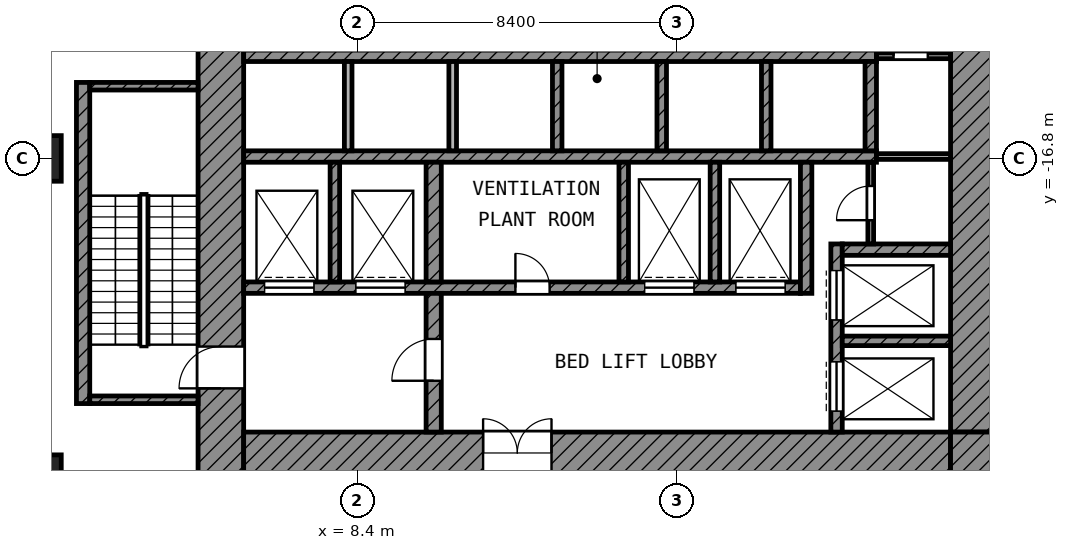
"""IFC4 building model, lengths in metres.
Left out: names, types, materials, properties, quantities, classifications, styles, units other than length and angle.
Written with IfcOpenShell. Run it as: python <this file> out.ifc"""

import sys

from ifc_helpers import new_model, si_unit, direction, frame, frame_2d, origin, origin_2d, place, context, subcontext, project, spatial, rectangle, extrude, element, fill, save


model = new_model("IFC4")
c1 = context("Model", 3, precision=1e-05, world=origin(), true_north=direction((0.0, 1.0)))
c2 = subcontext(c1, "Body", "Model", "MODEL_VIEW")
j1 = project(units=[si_unit("LENGTHUNIT", "METRE"), si_unit("PLANEANGLEUNIT", "RADIAN")], contexts=[c1])
p1 = place(None, origin())
s1 = spatial("IfcSite", under=j1, at=p1, CompositionType="ELEMENT")
p2 = place(p1, origin())
s2 = spatial("IfcBuilding", under=s1, at=p2, CompositionType="ELEMENT")
p3 = place(p2, frame((0.0, 0.0, 34.2)))
s3 = spatial("IfcBuildingStorey", under=s2, at=p3, CompositionType="ELEMENT", Elevation=34.2)
for number, where, z_axis, x_axis in (
    (1, (0.0, -16.8, 0.0), (0.0, 0.0, 1.0), (1.0, 0.0, 0.0)),
    (2, (0.0, -25.2, 0.0), (0.0, 0.0, 1.0), (1.0, 0.0, 0.0)),
):
    element("IfcColumn", number, at=place(p3, frame(where, z_axis=z_axis, x_axis=x_axis)), inside=s3, PredefinedType="COLUMN", context=c2, shape_type="SweptSolid", body=[
        extrude(rectangle(XDim=1.2, YDim=1.2, at=origin_2d()), origin(), (0.0, 0.0, 1.0), 5.0),
    ])
p4 = place(p3, frame((4.8, -25.1, 0.0), z_axis=(0.0, 0.0, 1.0), x_axis=(0.0, 1.0, 0.0)))
e3 = element("IfcWall", 3, at=p4, inside=s3, PredefinedType="SHEAR", context=c2, shape_type="SweptSolid", body=[
    extrude(rectangle(XDim=19.7, YDim=1.2, at=frame_2d((9.85, 0.0))), origin(), (0.0, 0.0, 1.0), 4.58),
])
p5 = place(p4, frame((11.55, 0.0, 0.0)))
e4 = element("IfcOpeningElement", 4, at=p5, cuts=e3, PredefinedType="OPENING", context=c2, shape_type="SweptSolid", body=[
    extrude(rectangle(XDim=1.1, YDim=2.1, at=frame_2d((0.55, 1.05))), frame((0.0, 0.61, 0.0), z_axis=(0.0, -1.0, 0.0), x_axis=(1.0, 0.0, 0.0)), (0.0, 0.0, 1.0), 1.22),
])
p6 = place(p4, frame((2.25, 0.0, 0.0)))
e5 = element("IfcOpeningElement", 5, at=p6, cuts=e3, PredefinedType="OPENING", context=c2, shape_type="SweptSolid", body=[
    extrude(rectangle(XDim=1.1, YDim=2.1, at=frame_2d((0.55, 1.05))), frame((0.0, 0.61, 0.0), z_axis=(0.0, -1.0, 0.0), x_axis=(1.0, 0.0, 0.0)), (0.0, 0.0, 1.0), 1.22),
])
p7 = place(p3, frame((24.55, -24.0, 0.0), z_axis=(0.0, 0.0, 1.0), x_axis=(0.0, 1.0, 0.0)))
e6 = element("IfcWall", 6, at=p7, inside=s3, PredefinedType="SHEAR", context=c2, shape_type="SweptSolid", body=[
    extrude(rectangle(XDim=18.6, YDim=1.1, at=frame_2d((9.3, 0.0))), origin(), (0.0, 0.0, 1.0), 4.58),
])
p8 = place(p7, frame((10.5, 0.0, 0.0)))
e7 = element("IfcOpeningElement", 7, at=p8, cuts=e6, PredefinedType="OPENING", context=c2, shape_type="SweptSolid", body=[
    extrude(rectangle(XDim=1.8, YDim=2.1, at=frame_2d((0.9, 1.05))), frame((0.0, 0.56, 0.0), z_axis=(0.0, -1.0, 0.0), x_axis=(1.0, 0.0, 0.0)), (0.0, 0.0, 1.0), 1.12),
])
p9 = place(p3, frame((5.4, -24.55, 0.0), z_axis=(0.0, 0.0, 1.0), x_axis=(1.0, 0.0, 0.0)))
e8 = element("IfcWall", 8, at=p9, inside=s3, PredefinedType="SHEAR", context=c2, shape_type="SweptSolid", body=[
    extrude(rectangle(XDim=18.6, YDim=1.1, at=frame_2d((9.3, 0.0))), origin(), (0.0, 0.0, 1.0), 4.58),
])
p10 = place(p9, frame((6.3, 0.0, 0.0)))
e9 = element("IfcOpeningElement", 9, at=p10, cuts=e8, PredefinedType="OPENING", context=c2, shape_type="SweptSolid", body=[
    extrude(rectangle(XDim=1.8, YDim=2.1, at=frame_2d((0.9, 1.05))), frame((0.0, 0.56, 0.0), z_axis=(0.0, -1.0, 0.0), x_axis=(1.0, 0.0, 0.0)), (0.0, 0.0, 1.0), 1.12),
])
p11 = place(p3, frame((24.55, -25.1, 0.0), z_axis=(0.0, 0.0, 1.0), x_axis=(0.0, 1.0, 0.0)))
e10 = element("IfcWall", 10, at=p11, inside=s3, PredefinedType="SHEAR", context=c2, shape_type="SweptSolid", body=[
    extrude(rectangle(XDim=1.1, YDim=1.1, at=frame_2d((0.55, 0.0))), origin(), (0.0, 0.0, 1.0), 4.58),
])
for number, where, z_axis, x_axis in (
    (11, (5.4, -14.1, 0.0), (0.0, 0.0, 1.0), (1.0, 0.0, 0.0)),
    (12, (5.4, -16.75, 0.0), (0.0, 0.0, 1.0), (1.0, 0.0, 0.0)),
):
    element("IfcWall", number, at=place(p3, frame(where, z_axis=z_axis, x_axis=x_axis)), inside=s3, PredefinedType="SHEAR", context=c2, shape_type="SweptSolid", body=[
        extrude(rectangle(XDim=16.65, YDim=0.3, at=frame_2d((8.325, 0.0))), origin(), (0.0, 0.0, 1.0), 4.58),
    ])
p12 = place(p3, frame((5.4, -20.2, 0.0), z_axis=(0.0, 0.0, 1.0), x_axis=(1.0, 0.0, 0.0)))
e13 = element("IfcWall", 13, at=p12, inside=s3, PredefinedType="SHEAR", context=c2, shape_type="SweptSolid", body=[
    extrude(rectangle(XDim=14.65, YDim=0.3, at=frame_2d((7.325, 0.0))), origin(), (0.0, 0.0, 1.0), 4.58),
])
p13 = place(p12, frame((10.55, 0.0, 0.0)))
e14 = element("IfcOpeningElement", 14, at=p13, cuts=e13, PredefinedType="OPENING", context=c2, shape_type="SweptSolid", body=[
    extrude(rectangle(XDim=1.3, YDim=2.1, at=frame_2d((0.65, 1.05))), frame((0.0, 0.16, 0.0), z_axis=(0.0, -1.0, 0.0), x_axis=(1.0, 0.0, 0.0)), (0.0, 0.0, 1.0), 0.32),
])
p14 = place(p12, frame((12.95, 0.0, 0.0)))
e15 = element("IfcOpeningElement", 15, at=p14, cuts=e13, PredefinedType="OPENING", context=c2, shape_type="SweptSolid", body=[
    extrude(rectangle(XDim=1.3, YDim=2.1, at=frame_2d((0.65, 1.05))), frame((0.0, 0.16, 0.0), z_axis=(0.0, -1.0, 0.0), x_axis=(1.0, 0.0, 0.0)), (0.0, 0.0, 1.0), 0.32),
])
p15 = place(p12, frame((0.55, 0.0, 0.0)))
e16 = element("IfcOpeningElement", 16, at=p15, cuts=e13, PredefinedType="OPENING", context=c2, shape_type="SweptSolid", body=[
    extrude(rectangle(XDim=1.3, YDim=2.1, at=frame_2d((0.65, 1.05))), frame((0.0, 0.16, 0.0), z_axis=(0.0, -1.0, 0.0), x_axis=(1.0, 0.0, 0.0)), (0.0, 0.0, 1.0), 0.32),
])
p16 = place(p12, frame((2.95, 0.0, 0.0)))
e17 = element("IfcOpeningElement", 17, at=p16, cuts=e13, PredefinedType="OPENING", context=c2, shape_type="SweptSolid", body=[
    extrude(rectangle(XDim=1.3, YDim=2.1, at=frame_2d((0.65, 1.05))), frame((0.0, 0.16, 0.0), z_axis=(0.0, -1.0, 0.0), x_axis=(1.0, 0.0, 0.0)), (0.0, 0.0, 1.0), 0.32),
])
p17 = place(p12, frame((7.15, 0.0, 0.0)))
e18 = element("IfcOpeningElement", 18, at=p17, cuts=e13, PredefinedType="OPENING", context=c2, shape_type="SweptSolid", body=[
    extrude(rectangle(XDim=0.9, YDim=2.1, at=frame_2d((0.45, 1.05))), frame((0.0, 0.16, 0.0), z_axis=(0.0, -1.0, 0.0), x_axis=(1.0, 0.0, 0.0)), (0.0, 0.0, 1.0), 0.32),
])
p18 = place(p3, frame((10.4, -24.0, 0.0), z_axis=(0.0, 0.0, 1.0), x_axis=(0.0, 1.0, 0.0)))
e19 = element("IfcWall", 19, at=p18, inside=s3, PredefinedType="SHEAR", context=c2, shape_type="SweptSolid", body=[
    extrude(rectangle(XDim=3.65, YDim=0.4, at=frame_2d((1.825, 0.0))), origin(), (0.0, 0.0, 1.0), 4.58),
])
p19 = place(p18, frame((1.35, 0.0, 0.0)))
e20 = element("IfcOpeningElement", 20, at=p19, cuts=e19, PredefinedType="OPENING", context=c2, shape_type="SweptSolid", body=[
    extrude(rectangle(XDim=1.1, YDim=2.1, at=frame_2d((0.55, 1.05))), frame((0.0, 0.21, 0.0), z_axis=(0.0, -1.0, 0.0), x_axis=(1.0, 0.0, 0.0)), (0.0, 0.0, 1.0), 0.42),
])
p20 = place(p3, frame((10.4, -20.05, 0.0), z_axis=(0.0, 0.0, 1.0), x_axis=(0.0, 1.0, 0.0)))
e21 = element("IfcWall", 21, at=p20, inside=s3, PredefinedType="SHEAR", context=c2, shape_type="SweptSolid", body=[
    extrude(rectangle(XDim=3.15, YDim=0.4, at=frame_2d((1.575, 0.0))), origin(), (0.0, 0.0, 1.0), 4.58),
])
p21 = place(p3, frame((20.2, -20.35, 0.0), z_axis=(0.0, 0.0, 1.0), x_axis=(0.0, 1.0, 0.0)))
e22 = element("IfcWall", 22, at=p21, inside=s3, PredefinedType="SHEAR", context=c2, shape_type="SweptSolid", body=[
    extrude(rectangle(XDim=3.45, YDim=0.3, at=frame_2d((1.725, 0.0))), origin(), (0.0, 0.0, 1.0), 4.58),
])
p22 = place(p3, frame((21.9, -16.6, 0.0), z_axis=(0.0, 0.0, 1.0), x_axis=(0.0, 1.0, 0.0)))
e23 = element("IfcWall", 23, at=p22, inside=s3, PredefinedType="SHEAR", context=c2, shape_type="SweptSolid", body=[
    extrude(rectangle(XDim=2.35, YDim=0.3, at=frame_2d((1.175, 0.0))), origin(), (0.0, 0.0, 1.0), 4.58),
])
p23 = place(p3, frame((21.15, -19.2, 0.0), z_axis=(0.0, 0.0, 1.0), x_axis=(1.0, 0.0, 0.0)))
e24 = element("IfcWall", 24, at=p23, inside=s3, PredefinedType="SHEAR", context=c2, shape_type="SweptSolid", body=[
    extrude(rectangle(XDim=2.85, YDim=0.3, at=frame_2d((1.425, 0.0))), origin(), (0.0, 0.0, 1.0), 4.58),
])
p24 = place(p3, frame((21.0, -24.0, 0.0), z_axis=(0.0, 0.0, 1.0), x_axis=(0.0, 1.0, 0.0)))
e25 = element("IfcWall", 25, at=p24, inside=s3, PredefinedType="SHEAR", context=c2, shape_type="SweptSolid", body=[
    extrude(rectangle(XDim=4.95, YDim=0.3, at=frame_2d((2.475, 0.0))), origin(), (0.0, 0.0, 1.0), 4.58),
])
p25 = place(p24, frame((2.95, 0.0, 0.0)))
e26 = element("IfcOpeningElement", 26, at=p25, cuts=e25, PredefinedType="OPENING", context=c2, shape_type="SweptSolid", body=[
    extrude(rectangle(XDim=1.3, YDim=2.1, at=frame_2d((0.65, 1.05))), frame((0.0, 0.16, 0.0), z_axis=(0.0, -1.0, 0.0), x_axis=(1.0, 0.0, 0.0)), (0.0, 0.0, 1.0), 0.32),
])
p26 = place(p24, frame((0.55, 0.0, 0.0)))
e27 = element("IfcOpeningElement", 27, at=p26, cuts=e25, PredefinedType="OPENING", context=c2, shape_type="SweptSolid", body=[
    extrude(rectangle(XDim=1.3, YDim=2.1, at=frame_2d((0.65, 1.05))), frame((0.0, 0.16, 0.0), z_axis=(0.0, -1.0, 0.0), x_axis=(1.0, 0.0, 0.0)), (0.0, 0.0, 1.0), 0.32),
])
p27 = place(p3, frame((21.15, -21.6, 0.0), z_axis=(0.0, 0.0, 1.0), x_axis=(1.0, 0.0, 0.0)))
e28 = element("IfcWall", 28, at=p27, inside=s3, PredefinedType="SHEAR", context=c2, shape_type="SweptSolid", body=[
    extrude(rectangle(XDim=2.85, YDim=0.25, at=frame_2d((1.425, 0.0))), origin(), (0.0, 0.0, 1.0), 4.58),
])
for number, where, z_axis, x_axis in (
    (29, (7.8, -20.05, 0.0), (0.0, 0.0, 1.0), (0.0, 1.0, 0.0)),
    (30, (15.4, -20.05, 0.0), (0.0, 0.0, 1.0), (0.0, 1.0, 0.0)),
    (31, (17.8, -20.05, 0.0), (0.0, 0.0, 1.0), (0.0, 1.0, 0.0)),
):
    element("IfcWall", number, at=place(p3, frame(where, z_axis=z_axis, x_axis=x_axis)), inside=s3, PredefinedType="SHEAR", context=c2, shape_type="SweptSolid", body=[
        extrude(rectangle(XDim=3.15, YDim=0.25, at=frame_2d((1.575, 0.0))), origin(), (0.0, 0.0, 1.0), 4.58),
    ])
for number, where, z_axis, x_axis in (
    (32, (8.15, -16.6, 0.0), (0.0, 0.0, 1.0), (0.0, 1.0, 0.0)),
    (33, (10.9, -16.6, 0.0), (0.0, 0.0, 1.0), (0.0, 1.0, 0.0)),
):
    element("IfcWall", number, at=place(p3, frame(where, z_axis=z_axis, x_axis=x_axis)), inside=s3, PredefinedType="PARTITIONING", context=c2, shape_type="SweptSolid", body=[
        extrude(rectangle(XDim=2.35, YDim=0.2, at=frame_2d((1.175, 0.0))), origin(), (0.0, 0.0, 1.0), 4.58),
    ])
for number, where, z_axis, x_axis in (
    (34, (13.65, -16.6, 0.0), (0.0, 0.0, 1.0), (0.0, 1.0, 0.0)),
    (35, (16.4, -16.6, 0.0), (0.0, 0.0, 1.0), (0.0, 1.0, 0.0)),
    (36, (19.15, -16.6, 0.0), (0.0, 0.0, 1.0), (0.0, 1.0, 0.0)),
):
    element("IfcWall", number, at=place(p3, frame(where, z_axis=z_axis, x_axis=x_axis)), inside=s3, PredefinedType="SHEAR", context=c2, shape_type="SweptSolid", body=[
        extrude(rectangle(XDim=2.35, YDim=0.25, at=frame_2d((1.175, 0.0))), origin(), (0.0, 0.0, 1.0), 4.58),
    ])
p28 = place(p3, frame((21.9, -19.05, 0.0), z_axis=(0.0, 0.0, 1.0), x_axis=(0.0, 1.0, 0.0)))
e37 = element("IfcWall", 37, at=p28, inside=s3, PredefinedType="PARTITIONING", context=c2, shape_type="SweptSolid", body=[
    extrude(rectangle(XDim=2.15, YDim=0.15, at=frame_2d((1.075, 0.0))), origin(), (0.0, 0.0, 1.0), 4.58),
])
p29 = place(p28, frame((0.625, 0.0, 0.0)))
e38 = element("IfcOpeningElement", 38, at=p29, cuts=e37, PredefinedType="OPENING", context=c2, shape_type="SweptSolid", body=[
    extrude(rectangle(XDim=0.9, YDim=2.1, at=frame_2d((0.45, 1.05))), frame((0.0, 0.085, 0.0), z_axis=(0.0, -1.0, 0.0), x_axis=(1.0, 0.0, 0.0)), (0.0, 0.0, 1.0), 0.17),
])
p30 = place(p3, frame((22.05, -16.75, 0.0), z_axis=(0.0, 0.0, 1.0), x_axis=(1.0, 0.0, 0.0)))
e39 = element("IfcWall", 39, at=p30, inside=s3, PredefinedType="PARTITIONING", context=c2, shape_type="SweptSolid", body=[
    extrude(rectangle(XDim=1.95, YDim=0.15, at=frame_2d((0.975, 0.0))), origin(), (0.0, 0.0, 1.0), 4.58),
])
p31 = place(p3, frame((22.05, -14.1, 0.0), z_axis=(0.0, 0.0, 1.0), x_axis=(1.0, 0.0, 0.0)))
e40 = element("IfcWall", 40, at=p31, inside=s3, PredefinedType="PARTITIONING", context=c2, shape_type="SweptSolid", body=[
    extrude(rectangle(XDim=1.95, YDim=0.15, at=frame_2d((0.975, 0.0))), origin(), (0.0, 0.0, 1.0), 4.58),
])
p32 = place(p31, frame((0.45, 0.0, 0.0)))
e41 = element("IfcOpeningElement", 41, at=p32, cuts=e40, PredefinedType="OPENING", context=c2, shape_type="SweptSolid", body=[
    extrude(rectangle(XDim=0.9, YDim=2.1, at=frame_2d((0.45, 1.05))), frame((0.0, 0.085, 0.0), z_axis=(0.0, -1.0, 0.0), x_axis=(1.0, 0.0, 0.0)), (0.0, 0.0, 1.0), 0.17),
])
p33 = place(p3, frame((1.175, -23.25, 0.0), z_axis=(0.0, 0.0, 1.0), x_axis=(0.0, 1.0, 0.0)))
e42 = element("IfcWall", 42, at=p33, inside=s3, PredefinedType="SHEAR", context=c2, shape_type="SweptSolid", body=[
    extrude(rectangle(XDim=8.45, YDim=0.35, at=frame_2d((4.225, 0.0))), origin(), (0.0, 0.0, 1.0), 4.58),
])
for number, where, z_axis, x_axis in (
    (43, (1.35, -14.9, 0.0), (0.0, 0.0, 1.0), (1.0, 0.0, 0.0)),
    (44, (1.35, -23.15, 0.0), (0.0, 0.0, 1.0), (1.0, 0.0, 0.0)),
):
    element("IfcWall", number, at=place(p3, frame(where, z_axis=z_axis, x_axis=x_axis)), inside=s3, PredefinedType="SHEAR", context=c2, shape_type="SweptSolid", body=[
        extrude(rectangle(XDim=2.85, YDim=0.2, at=frame_2d((1.425, 0.0))), origin(), (0.0, 0.0, 1.0), 4.58),
    ])
p34 = place(p25, origin())
e45 = element("IfcDoor", 45, at=p34, inside=s3, OperationType="DOUBLE_DOOR_SLIDING", PredefinedType="DOOR", context=c2, shape_type="SweptSolid", body=[
    extrude(rectangle(XDim=1.3, YDim=2.1, at=frame_2d((0.65, 1.05))), frame((0.0, 0.025, 0.0), z_axis=(0.0, -1.0, 0.0), x_axis=(1.0, 0.0, 0.0)), (0.0, 0.0, 1.0), 0.05),
])
fill(e26, e45)
p35 = place(p26, origin())
e46 = element("IfcDoor", 46, at=p35, inside=s3, OperationType="DOUBLE_DOOR_SLIDING", PredefinedType="DOOR", context=c2, shape_type="SweptSolid", body=[
    extrude(rectangle(XDim=1.3, YDim=2.1, at=frame_2d((0.65, 1.05))), frame((0.0, 0.025, 0.0), z_axis=(0.0, -1.0, 0.0), x_axis=(1.0, 0.0, 0.0)), (0.0, 0.0, 1.0), 0.05),
])
fill(e27, e46)
p36 = place(p13, origin())
e47 = element("IfcDoor", 47, at=p36, inside=s3, OperationType="DOUBLE_DOOR_SLIDING", PredefinedType="DOOR", context=c2, shape_type="SweptSolid", body=[
    extrude(rectangle(XDim=1.3, YDim=2.1, at=frame_2d((0.65, 1.05))), frame((0.0, 0.025, 0.0), z_axis=(0.0, -1.0, 0.0), x_axis=(1.0, 0.0, 0.0)), (0.0, 0.0, 1.0), 0.05),
])
fill(e14, e47)
p37 = place(p14, origin())
e48 = element("IfcDoor", 48, at=p37, inside=s3, OperationType="DOUBLE_DOOR_SLIDING", PredefinedType="DOOR", context=c2, shape_type="SweptSolid", body=[
    extrude(rectangle(XDim=1.3, YDim=2.1, at=frame_2d((0.65, 1.05))), frame((0.0, 0.025, 0.0), z_axis=(0.0, -1.0, 0.0), x_axis=(1.0, 0.0, 0.0)), (0.0, 0.0, 1.0), 0.05),
])
fill(e15, e48)
p38 = place(p15, origin())
e49 = element("IfcDoor", 49, at=p38, inside=s3, OperationType="DOUBLE_DOOR_SLIDING", PredefinedType="DOOR", context=c2, shape_type="SweptSolid", body=[
    extrude(rectangle(XDim=1.3, YDim=2.1, at=frame_2d((0.65, 1.05))), frame((0.0, 0.025, 0.0), z_axis=(0.0, -1.0, 0.0), x_axis=(1.0, 0.0, 0.0)), (0.0, 0.0, 1.0), 0.05),
])
fill(e16, e49)
p39 = place(p16, origin())
e50 = element("IfcDoor", 50, at=p39, inside=s3, OperationType="DOUBLE_DOOR_SLIDING", PredefinedType="DOOR", context=c2, shape_type="SweptSolid", body=[
    extrude(rectangle(XDim=1.3, YDim=2.1, at=frame_2d((0.65, 1.05))), frame((0.0, 0.025, 0.0), z_axis=(0.0, -1.0, 0.0), x_axis=(1.0, 0.0, 0.0)), (0.0, 0.0, 1.0), 0.05),
])
fill(e17, e50)
p40 = place(p6, origin())
e51 = element("IfcDoor", 51, at=p40, inside=s3, OperationType="SINGLE_SWING_LEFT", PredefinedType="DOOR", context=c2, shape_type="SweptSolid", body=[
    extrude(rectangle(XDim=1.1, YDim=2.1, at=frame_2d((0.55, 1.05))), frame((0.0, 0.025, 0.0), z_axis=(0.0, -1.0, 0.0), x_axis=(1.0, 0.0, 0.0)), (0.0, 0.0, 1.0), 0.05),
])
fill(e5, e51)
p41 = place(p19, origin())
e52 = element("IfcDoor", 52, at=p41, inside=s3, OperationType="SINGLE_SWING_LEFT", PredefinedType="DOOR", context=c2, shape_type="SweptSolid", body=[
    extrude(rectangle(XDim=1.1, YDim=2.1, at=frame_2d((0.55, 1.05))), frame((0.0, 0.025, 0.0), z_axis=(0.0, -1.0, 0.0), x_axis=(1.0, 0.0, 0.0)), (0.0, 0.0, 1.0), 0.05),
])
fill(e20, e52)
p42 = place(p10, origin())
e53 = element("IfcDoor", 53, at=p42, inside=s3, OperationType="DOUBLE_DOOR_SINGLE_SWING", PredefinedType="DOOR", context=c2, shape_type="SweptSolid", body=[
    extrude(rectangle(XDim=1.8, YDim=2.1, at=frame_2d((0.9, 1.05))), frame((0.0, 0.025, 0.0), z_axis=(0.0, -1.0, 0.0), x_axis=(1.0, 0.0, 0.0)), (0.0, 0.0, 1.0), 0.05),
])
fill(e9, e53)
p43 = place(p32, origin())
e54 = element("IfcDoor", 54, at=p43, inside=s3, OperationType="SINGLE_SWING_LEFT", PredefinedType="DOOR", context=c2, shape_type="SweptSolid", body=[
    extrude(rectangle(XDim=0.9, YDim=2.1, at=frame_2d((0.45, 1.05))), frame((0.0, 0.025, 0.0), z_axis=(0.0, -1.0, 0.0), x_axis=(1.0, 0.0, 0.0)), (0.0, 0.0, 1.0), 0.05),
])
fill(e41, e54)
p44 = place(p29, origin())
e55 = element("IfcDoor", 55, at=p44, inside=s3, OperationType="SINGLE_SWING_LEFT", PredefinedType="DOOR", context=c2, shape_type="SweptSolid", body=[
    extrude(rectangle(XDim=0.9, YDim=2.1, at=frame_2d((0.45, 1.05))), frame((0.0, 0.025, 0.0), z_axis=(0.0, -1.0, 0.0), x_axis=(1.0, 0.0, 0.0)), (0.0, 0.0, 1.0), 0.05),
])
fill(e38, e55)
p45 = place(p17, origin())
e56 = element("IfcDoor", 56, at=p45, inside=s3, OperationType="SINGLE_SWING_LEFT", PredefinedType="DOOR", context=c2, shape_type="SweptSolid", body=[
    extrude(rectangle(XDim=0.9, YDim=2.1, at=frame_2d((0.45, 1.05))), frame((0.0, 0.025, 0.0), z_axis=(0.0, -1.0, 0.0), x_axis=(1.0, 0.0, 0.0)), (0.0, 0.0, 1.0), 0.05),
])
fill(e18, e56)
save(model, sys.argv[1])
